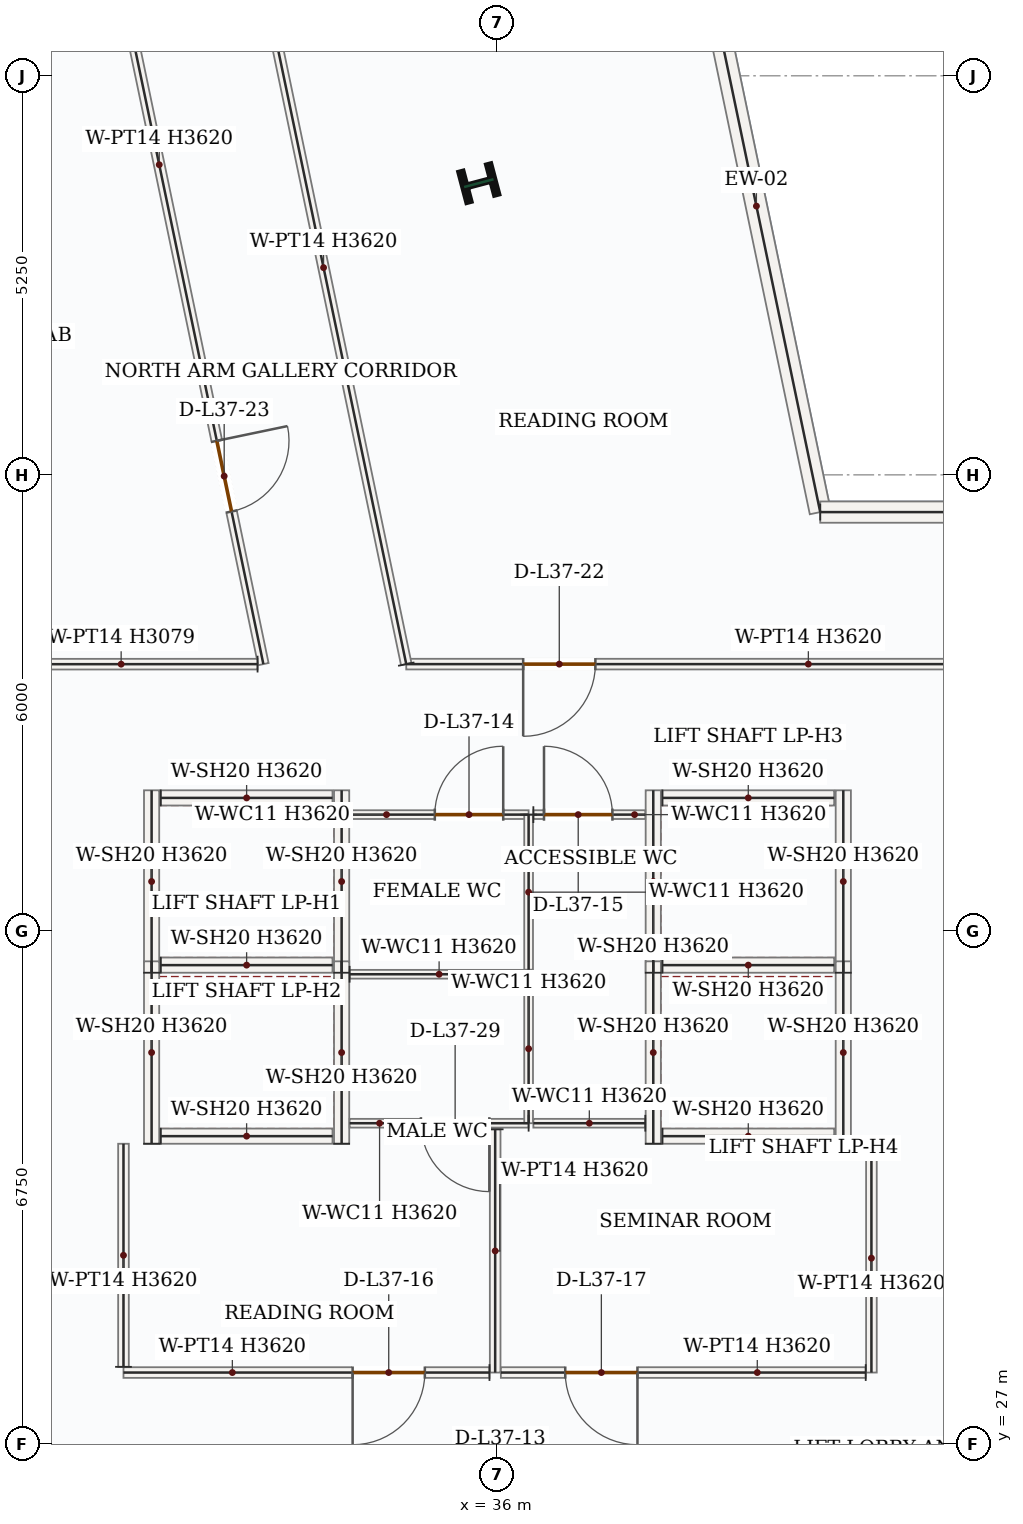
"""IFC4 building model, lengths in metres.
Left out: names, types, materials, properties, quantities, classifications, styles, units other than length and angle.
Written with IfcOpenShell. Run it as: python <this file> out.ifc"""

import sys

from ifc_helpers import new_model, si_unit, direction, frame, frame_2d, origin, origin_2d, place, context, subcontext, project, spatial, rectangle, i_section, extrude, source, transform, mapped, element, fill, save


model = new_model("IFC4")
c1 = context("Model", 3, precision=1e-05, world=origin(), true_north=direction((0.0, 1.0)))
c2 = subcontext(c1, "Body", "Model", "MODEL_VIEW")
j1 = project(units=[si_unit("LENGTHUNIT", "METRE"), si_unit("PLANEANGLEUNIT", "RADIAN")], contexts=[c1])
p1 = place(None, origin())
s1 = spatial("IfcSite", under=j1, at=p1, CompositionType="ELEMENT")
p2 = place(p1, origin())
s2 = spatial("IfcBuilding", under=s1, at=p2, CompositionType="ELEMENT")
p3 = place(p2, frame((0.0, 0.0, 162.9)))
s3 = spatial("IfcBuildingStorey", under=s2, at=p3, CompositionType="ELEMENT", Elevation=162.9)
m1 = source(origin(), c2, "Body", "SweptSolid", [
    extrude(i_section(OverallWidth=0.412, OverallDepth=0.435, WebThickness=0.036, FlangeThickness=0.057, FilletRadius=0.018, at=origin_2d()), origin(), (0.0, 0.0, 1.0), 3.9),
])
p4 = place(p3, frame((35.755, 43.588, 0.0), z_axis=(0.0, 0.0, 1.0), x_axis=(-0.255445757936, 0.966823388604, 0.0)))
e1 = element("IfcColumn", 1, at=p4, inside=s3, PredefinedType="COLUMN", context=c2, shape_type="MappedRepresentation", body=[
    mapped(m1, transform((0.0, 0.0, 0.0), x_axis=(1.0, 0.0, 0.0), y_axis=(0.0, 1.0, 0.0), z_axis=(0.0, 0.0, 1.0), scale=1.0)),
])
m2 = source(origin(), c2, "Body", "SweptSolid", [
    extrude(rectangle(XDim=8.225, YDim=0.28, at=frame_2d((4.113, 0.0))), origin(), (0.0, 0.0, 1.0), 3.62),
])
p5 = place(p3, frame((38.567, 47.312, 0.0), z_axis=(0.0, 0.0, 1.0), x_axis=(0.204152195211, -0.978939161128, 0.0)))
e2 = element("IfcWall", 2, at=p5, inside=s3, PredefinedType="SOLIDWALL", context=c2, shape_type="MappedRepresentation", body=[
    mapped(m2, transform((0.0, 0.0, 0.0), x_axis=(1.0, 0.0, 0.0), y_axis=(0.0, 1.0, 0.0), z_axis=(0.0, 0.0, 1.0), scale=1.0)),
])
m3 = source(origin(), c2, "Body", "SweptSolid", [
    extrude(rectangle(XDim=9.095, YDim=0.28, at=frame_2d((4.548, 0.0))), origin(), (0.0, 0.0, 1.0), 3.62),
])
p6 = place(p3, frame((40.247, 39.26, 0.0), z_axis=(0.0, 0.0, 1.0), x_axis=(1.0, 0.0, 0.0)))
e3 = element("IfcWall", 3, at=p6, inside=s3, PredefinedType="SOLIDWALL", context=c2, shape_type="MappedRepresentation", body=[
    mapped(m3, transform((0.0, 0.0, 0.0), x_axis=(1.0, 0.0, 0.0), y_axis=(0.0, 1.0, 0.0), z_axis=(0.0, 0.0, 1.0), scale=1.0)),
])
m4 = source(origin(), c2, "Body", "SweptSolid", [
    extrude(rectangle(XDim=2.4, YDim=0.2, at=frame_2d((1.2, 0.0))), origin(), (0.0, 0.0, 1.0), 3.62),
])
for number, where, z_axis, x_axis in (
    (4, (31.45, 33.2, 0.0), (0.0, 0.0, 1.0), (0.0, 1.0, 0.0)),
    (5, (33.95, 33.2, 0.0), (0.0, 0.0, 1.0), (0.0, 1.0, 0.0)),
):
    element("IfcWall", number, at=place(p3, frame(where, z_axis=z_axis, x_axis=x_axis)), inside=s3, PredefinedType="SOLIDWALL", context=c2, shape_type="MappedRepresentation", body=[
        mapped(m4, transform((0.0, 0.0, 0.0), x_axis=(1.0, 0.0, 0.0), y_axis=(0.0, 1.0, 0.0), z_axis=(0.0, 0.0, 1.0), scale=1.0)),
    ])
m5 = source(origin(), c2, "Body", "SweptSolid", [
    extrude(rectangle(XDim=2.26, YDim=0.2, at=frame_2d((1.13, 0.0))), origin(), (0.0, 0.0, 1.0), 3.62),
])
for number, where, z_axis, x_axis in (
    (6, (31.57, 33.3, 0.0), (0.0, 0.0, 1.0), (1.0, 0.0, 0.0)),
    (7, (31.57, 35.5, 0.0), (0.0, 0.0, 1.0), (1.0, 0.0, 0.0)),
):
    element("IfcWall", number, at=place(p3, frame(where, z_axis=z_axis, x_axis=x_axis)), inside=s3, PredefinedType="SOLIDWALL", context=c2, shape_type="MappedRepresentation", body=[
        mapped(m5, transform((0.0, 0.0, 0.0), x_axis=(1.0, 0.0, 0.0), y_axis=(0.0, 1.0, 0.0), z_axis=(0.0, 0.0, 1.0), scale=1.0)),
    ])
for number, where, z_axis, x_axis in (
    (8, (31.45, 30.95, 0.0), (0.0, 0.0, 1.0), (0.0, 1.0, 0.0)),
    (9, (33.95, 30.95, 0.0), (0.0, 0.0, 1.0), (0.0, 1.0, 0.0)),
):
    element("IfcWall", number, at=place(p3, frame(where, z_axis=z_axis, x_axis=x_axis)), inside=s3, PredefinedType="SOLIDWALL", context=c2, shape_type="MappedRepresentation", body=[
        mapped(m4, transform((0.0, 0.0, 0.0), x_axis=(1.0, 0.0, 0.0), y_axis=(0.0, 1.0, 0.0), z_axis=(0.0, 0.0, 1.0), scale=1.0)),
    ])
p7 = place(p3, frame((31.57, 31.05, 0.0), z_axis=(0.0, 0.0, 1.0), x_axis=(1.0, 0.0, 0.0)))
e10 = element("IfcWall", 10, at=p7, inside=s3, PredefinedType="SOLIDWALL", context=c2, shape_type="MappedRepresentation", body=[
    mapped(m5, transform((0.0, 0.0, 0.0), x_axis=(1.0, 0.0, 0.0), y_axis=(0.0, 1.0, 0.0), z_axis=(0.0, 0.0, 1.0), scale=1.0)),
])
for number, where, z_axis, x_axis in (
    (11, (38.05, 33.2, 0.0), (0.0, 0.0, 1.0), (0.0, 1.0, 0.0)),
    (12, (40.55, 33.2, 0.0), (0.0, 0.0, 1.0), (0.0, 1.0, 0.0)),
):
    element("IfcWall", number, at=place(p3, frame(where, z_axis=z_axis, x_axis=x_axis)), inside=s3, PredefinedType="SOLIDWALL", context=c2, shape_type="MappedRepresentation", body=[
        mapped(m4, transform((0.0, 0.0, 0.0), x_axis=(1.0, 0.0, 0.0), y_axis=(0.0, 1.0, 0.0), z_axis=(0.0, 0.0, 1.0), scale=1.0)),
    ])
for number, where, z_axis, x_axis in (
    (13, (38.17, 33.3, 0.0), (0.0, 0.0, 1.0), (1.0, 0.0, 0.0)),
    (14, (38.17, 35.5, 0.0), (0.0, 0.0, 1.0), (1.0, 0.0, 0.0)),
):
    element("IfcWall", number, at=place(p3, frame(where, z_axis=z_axis, x_axis=x_axis)), inside=s3, PredefinedType="SOLIDWALL", context=c2, shape_type="MappedRepresentation", body=[
        mapped(m5, transform((0.0, 0.0, 0.0), x_axis=(1.0, 0.0, 0.0), y_axis=(0.0, 1.0, 0.0), z_axis=(0.0, 0.0, 1.0), scale=1.0)),
    ])
for number, where, z_axis, x_axis in (
    (15, (38.05, 30.95, 0.0), (0.0, 0.0, 1.0), (0.0, 1.0, 0.0)),
    (16, (40.55, 30.95, 0.0), (0.0, 0.0, 1.0), (0.0, 1.0, 0.0)),
):
    element("IfcWall", number, at=place(p3, frame(where, z_axis=z_axis, x_axis=x_axis)), inside=s3, PredefinedType="SOLIDWALL", context=c2, shape_type="MappedRepresentation", body=[
        mapped(m4, transform((0.0, 0.0, 0.0), x_axis=(1.0, 0.0, 0.0), y_axis=(0.0, 1.0, 0.0), z_axis=(0.0, 0.0, 1.0), scale=1.0)),
    ])
p8 = place(p3, frame((38.17, 31.05, 0.0), z_axis=(0.0, 0.0, 1.0), x_axis=(1.0, 0.0, 0.0)))
e17 = element("IfcWall", 17, at=p8, inside=s3, PredefinedType="SOLIDWALL", context=c2, shape_type="MappedRepresentation", body=[
    mapped(m5, transform((0.0, 0.0, 0.0), x_axis=(1.0, 0.0, 0.0), y_axis=(0.0, 1.0, 0.0), z_axis=(0.0, 0.0, 1.0), scale=1.0)),
])
p9 = place(p3, frame((36.41, 31.22, 0.0), z_axis=(0.0, 0.0, 1.0), x_axis=(-1.0, 0.0, 0.0)))
e18 = element("IfcWall", 18, at=p9, inside=s3, PredefinedType="PARTITIONING", context=c2, shape_type="SweptSolid", body=[
    extrude(rectangle(XDim=2.355, YDim=0.115, at=frame_2d((1.177, 0.0))), origin(), (0.0, 0.0, 1.0), 3.62),
])
p10 = place(p9, frame((0.517, 0.0, 0.0)))
e19 = element("IfcOpeningElement", 19, at=p10, cuts=e18, PredefinedType="OPENING", context=c2, shape_type="SweptSolid", body=[
    extrude(rectangle(XDim=0.9, YDim=2.1, at=frame_2d((0.45, 1.05))), frame((0.0, 0.067, 0.0), z_axis=(0.0, -1.0, 0.0), x_axis=(1.0, 0.0, 0.0)), (0.0, 0.0, 1.0), 0.135),
])
m6 = source(origin(), c2, "Body", "SweptSolid", [
    extrude(rectangle(XDim=2.355, YDim=0.115, at=frame_2d((1.177, 0.0))), origin(), (0.0, 0.0, 1.0), 3.62),
])
p11 = place(p3, frame((34.055, 33.18, 0.0), z_axis=(0.0, 0.0, 1.0), x_axis=(1.0, 0.0, 0.0)))
e20 = element("IfcWall", 20, at=p11, inside=s3, PredefinedType="PARTITIONING", context=c2, shape_type="MappedRepresentation", body=[
    mapped(m6, transform((0.0, 0.0, 0.0), x_axis=(1.0, 0.0, 0.0), y_axis=(0.0, 1.0, 0.0), z_axis=(0.0, 0.0, 1.0), scale=1.0)),
])
m7 = source(origin(), c2, "Body", "SweptSolid", [
    extrude(rectangle(XDim=1.96, YDim=0.115, at=frame_2d((0.98, 0.0))), origin(), (0.0, 0.0, 1.0), 3.62),
])
p12 = place(p3, frame((36.41, 33.18, 0.0), z_axis=(0.0, 0.0, 1.0), x_axis=(0.0, -1.0, 0.0)))
e21 = element("IfcWall", 21, at=p12, inside=s3, PredefinedType="PARTITIONING", context=c2, shape_type="MappedRepresentation", body=[
    mapped(m7, transform((0.0, 0.0, 0.0), x_axis=(1.0, 0.0, 0.0), y_axis=(0.0, 1.0, 0.0), z_axis=(0.0, 0.0, 1.0), scale=1.0)),
])
p13 = place(p3, frame((34.055, 35.28, 0.0), z_axis=(0.0, 0.0, 1.0), x_axis=(1.0, 0.0, 0.0)))
e22 = element("IfcWall", 22, at=p13, inside=s3, PredefinedType="PARTITIONING", context=c2, shape_type="SweptSolid", body=[
    extrude(rectangle(XDim=2.355, YDim=0.115, at=frame_2d((1.177, 0.0))), origin(), (0.0, 0.0, 1.0), 3.62),
])
p14 = place(p13, frame((1.121, 0.0, 0.0)))
e23 = element("IfcOpeningElement", 23, at=p14, cuts=e22, PredefinedType="OPENING", context=c2, shape_type="SweptSolid", body=[
    extrude(rectangle(XDim=0.9, YDim=2.1, at=frame_2d((0.45, 1.05))), frame((0.0, 0.067, 0.0), z_axis=(0.0, -1.0, 0.0), x_axis=(1.0, 0.0, 0.0)), (0.0, 0.0, 1.0), 0.135),
])
m8 = source(origin(), c2, "Body", "SweptSolid", [
    extrude(rectangle(XDim=2.04, YDim=0.115, at=frame_2d((1.02, 0.0))), origin(), (0.0, 0.0, 1.0), 3.62),
])
p15 = place(p3, frame((36.41, 35.28, 0.0), z_axis=(0.0, 0.0, 1.0), x_axis=(0.0, -1.0, 0.0)))
e24 = element("IfcWall", 24, at=p15, inside=s3, PredefinedType="PARTITIONING", context=c2, shape_type="MappedRepresentation", body=[
    mapped(m8, transform((0.0, 0.0, 0.0), x_axis=(1.0, 0.0, 0.0), y_axis=(0.0, 1.0, 0.0), z_axis=(0.0, 0.0, 1.0), scale=1.0)),
])
m9 = source(origin(), c2, "Body", "SweptSolid", [
    extrude(rectangle(XDim=1.473, YDim=0.115, at=frame_2d((0.736, 0.0))), origin(), (0.0, 0.0, 1.0), 3.62),
])
p16 = place(p3, frame((37.945, 31.22, 0.0), z_axis=(0.0, 0.0, 1.0), x_axis=(-1.0, 0.0, 0.0)))
e25 = element("IfcWall", 25, at=p16, inside=s3, PredefinedType="PARTITIONING", context=c2, shape_type="MappedRepresentation", body=[
    mapped(m9, transform((0.0, 0.0, 0.0), x_axis=(1.0, 0.0, 0.0), y_axis=(0.0, 1.0, 0.0), z_axis=(0.0, 0.0, 1.0), scale=1.0)),
])
p17 = place(p3, frame((36.472, 35.28, 0.0), z_axis=(0.0, 0.0, 1.0), x_axis=(1.0, 0.0, 0.0)))
e26 = element("IfcWall", 26, at=p17, inside=s3, PredefinedType="PARTITIONING", context=c2, shape_type="SweptSolid", body=[
    extrude(rectangle(XDim=1.473, YDim=0.115, at=frame_2d((0.736, 0.0))), origin(), (0.0, 0.0, 1.0), 3.62),
])
p18 = place(p17, frame((0.14, 0.0, 0.0)))
e27 = element("IfcOpeningElement", 27, at=p18, cuts=e26, PredefinedType="OPENING", context=c2, shape_type="SweptSolid", body=[
    extrude(rectangle(XDim=0.9, YDim=2.1, at=frame_2d((0.45, 1.05))), frame((0.0, 0.067, 0.0), z_axis=(0.0, -1.0, 0.0), x_axis=(1.0, 0.0, 0.0)), (0.0, 0.0, 1.0), 0.135),
])
m10 = source(origin(), c2, "Body", "SweptSolid", [
    extrude(rectangle(XDim=3.2, YDim=0.14, at=frame_2d((1.6, 0.0))), origin(), (0.0, 0.0, 1.0), 3.62),
])
p19 = place(p3, frame((35.97, 31.14, 0.0), z_axis=(0.0, 0.0, 1.0), x_axis=(0.0, -1.0, 0.0)))
e28 = element("IfcWall", 28, at=p19, inside=s3, PredefinedType="PARTITIONING", context=c2, shape_type="MappedRepresentation", body=[
    mapped(m10, transform((0.0, 0.0, 0.0), x_axis=(1.0, 0.0, 0.0), y_axis=(0.0, 1.0, 0.0), z_axis=(0.0, 0.0, 1.0), scale=1.0)),
])
p20 = place(p3, frame((35.895, 27.94, 0.0), z_axis=(0.0, 0.0, 1.0), x_axis=(-1.0, 0.0, 0.0)))
e29 = element("IfcWall", 29, at=p20, inside=s3, PredefinedType="PARTITIONING", context=c2, shape_type="SweptSolid", body=[
    extrude(rectangle(XDim=4.815, YDim=0.14, at=frame_2d((2.407, 0.0))), origin(), (0.0, 0.0, 1.0), 3.62),
])
p21 = place(p20, frame((0.85, 0.0, 0.0)))
e30 = element("IfcOpeningElement", 30, at=p21, cuts=e29, PredefinedType="OPENING", context=c2, shape_type="SweptSolid", body=[
    extrude(rectangle(XDim=0.95, YDim=2.15, at=frame_2d((0.475, 1.075))), frame((0.0, 0.08, 0.0), z_axis=(0.0, -1.0, 0.0), x_axis=(1.0, 0.0, 0.0)), (0.0, 0.0, 1.0), 0.16),
])
m11 = source(origin(), c2, "Body", "SweptSolid", [
    extrude(rectangle(XDim=2.935, YDim=0.14, at=frame_2d((1.468, 0.0))), origin(), (0.0, 0.0, 1.0), 3.62),
])
p22 = place(p3, frame((31.08, 28.015, 0.0), z_axis=(0.0, 0.0, 1.0), x_axis=(0.0, 1.0, 0.0)))
e31 = element("IfcWall", 31, at=p22, inside=s3, PredefinedType="PARTITIONING", context=c2, shape_type="MappedRepresentation", body=[
    mapped(m11, transform((0.0, 0.0, 0.0), x_axis=(1.0, 0.0, 0.0), y_axis=(0.0, 1.0, 0.0), z_axis=(0.0, 0.0, 1.0), scale=1.0)),
])
m12 = source(origin(), c2, "Body", "SweptSolid", [
    extrude(rectangle(XDim=3.01, YDim=0.14, at=frame_2d((1.505, 0.0))), origin(), (0.0, 0.0, 1.0), 3.62),
])
p23 = place(p3, frame((40.92, 30.95, 0.0), z_axis=(0.0, 0.0, 1.0), x_axis=(0.0, -1.0, 0.0)))
e32 = element("IfcWall", 32, at=p23, inside=s3, PredefinedType="PARTITIONING", context=c2, shape_type="MappedRepresentation", body=[
    mapped(m12, transform((0.0, 0.0, 0.0), x_axis=(1.0, 0.0, 0.0), y_axis=(0.0, 1.0, 0.0), z_axis=(0.0, 0.0, 1.0), scale=1.0)),
])
p24 = place(p3, frame((40.845, 27.94, 0.0), z_axis=(0.0, 0.0, 1.0), x_axis=(-1.0, 0.0, 0.0)))
e33 = element("IfcWall", 33, at=p24, inside=s3, PredefinedType="PARTITIONING", context=c2, shape_type="SweptSolid", body=[
    extrude(rectangle(XDim=4.8, YDim=0.14, at=frame_2d((2.4, 0.0))), origin(), (0.0, 0.0, 1.0), 3.62),
])
p25 = place(p24, frame((3.003, 0.0, 0.0)))
e34 = element("IfcOpeningElement", 34, at=p25, cuts=e33, PredefinedType="OPENING", context=c2, shape_type="SweptSolid", body=[
    extrude(rectangle(XDim=0.95, YDim=2.15, at=frame_2d((0.475, 1.075))), frame((0.0, 0.08, 0.0), z_axis=(0.0, -1.0, 0.0), x_axis=(1.0, 0.0, 0.0)), (0.0, 0.0, 1.0), 0.16),
])
p26 = place(p3, frame((42.742, 37.26, 0.0), z_axis=(0.0, 0.0, 1.0), x_axis=(-1.0, 0.0, 0.0)))
e35 = element("IfcWall", 35, at=p26, inside=s3, PredefinedType="PARTITIONING", context=c2, shape_type="SweptSolid", body=[
    extrude(rectangle(XDim=7.942, YDim=0.14, at=frame_2d((3.971, 0.0))), origin(), (0.0, 0.0, 1.0), 3.62),
])
p27 = place(p26, frame((5.454, 0.0, 0.0)))
e36 = element("IfcOpeningElement", 36, at=p27, cuts=e35, PredefinedType="OPENING", context=c2, shape_type="SweptSolid", body=[
    extrude(rectangle(XDim=0.95, YDim=2.15, at=frame_2d((0.475, 1.075))), frame((0.0, 0.08, 0.0), z_axis=(0.0, -1.0, 0.0), x_axis=(1.0, 0.0, 0.0)), (0.0, 0.0, 1.0), 0.16),
])
m13 = source(origin(), c2, "Body", "SweptSolid", [
    extrude(rectangle(XDim=10.656, YDim=0.14, at=frame_2d((5.328, 0.0))), origin(), (0.0, 0.0, 1.0), 3.62),
])
p28 = place(p3, frame((34.8, 37.26, 0.0), z_axis=(0.0, 0.0, 1.0), x_axis=(-0.204159189901, 0.978937702399, 0.0)))
e37 = element("IfcWall", 37, at=p28, inside=s3, PredefinedType="PARTITIONING", context=c2, shape_type="MappedRepresentation", body=[
    mapped(m13, transform((0.0, 0.0, 0.0), x_axis=(1.0, 0.0, 0.0), y_axis=(0.0, 1.0, 0.0), z_axis=(0.0, 0.0, 1.0), scale=1.0)),
])
p29 = place(p3, frame((30.823, 47.316, 0.0), z_axis=(0.0, 0.0, 1.0), x_axis=(0.204130779611, -0.978943626985, 0.0)))
e38 = element("IfcWall", 38, at=p29, inside=s3, PredefinedType="PARTITIONING", context=c2, shape_type="SweptSolid", body=[
    extrude(rectangle(XDim=10.272, YDim=0.14, at=frame_2d((5.136, 0.0))), origin(), (0.0, 0.0, 1.0), 3.62),
])
p30 = place(p29, frame((7.271, 0.0, 0.0)))
e39 = element("IfcOpeningElement", 39, at=p30, cuts=e38, PredefinedType="OPENING", context=c2, shape_type="SweptSolid", body=[
    extrude(rectangle(XDim=0.95, YDim=2.15, at=frame_2d((0.475, 1.075))), frame((0.0, 0.08, 0.0), z_axis=(0.0, -1.0, 0.0), x_axis=(1.0, 0.0, 0.0)), (0.0, 0.0, 1.0), 0.16),
])
m14 = source(origin(), c2, "Body", "SweptSolid", [
    extrude(rectangle(XDim=3.589, YDim=0.14, at=frame_2d((1.794, 0.0))), origin(), (0.0, 0.0, 1.0), 3.079),
])
p31 = place(p3, frame((32.844, 37.26, 0.0), z_axis=(0.0, 0.0, 1.0), x_axis=(-0.999999942162, -0.000340112898, 0.0)))
e40 = element("IfcWall", 40, at=p31, inside=s3, PredefinedType="PARTITIONING", context=c2, shape_type="MappedRepresentation", body=[
    mapped(m14, transform((0.0, 0.0, 0.0), x_axis=(1.0, 0.0, 0.0), y_axis=(0.0, 1.0, 0.0), z_axis=(0.0, 0.0, 1.0), scale=1.0)),
])
m15 = source(origin(), c2, "Body", "SweptSolid", [
    extrude(rectangle(XDim=0.9, YDim=2.1, at=frame_2d((0.45, 1.05))), frame((0.0, 0.025, 0.0), z_axis=(0.0, -1.0, 0.0), x_axis=(1.0, 0.0, 0.0)), (0.0, 0.0, 1.0), 0.05),
])
p32 = place(p14, origin())
e41 = element("IfcDoor", 41, at=p32, inside=s3, OperationType="SINGLE_SWING_RIGHT", PredefinedType="DOOR", context=c2, shape_type="MappedRepresentation", body=[
    mapped(m15, transform((0.0, 0.0, 0.0), x_axis=(1.0, 0.0, 0.0), y_axis=(0.0, 1.0, 0.0), z_axis=(0.0, 0.0, 1.0), scale=1.0)),
])
fill(e23, e41)
p33 = place(p18, origin())
e42 = element("IfcDoor", 42, at=p33, inside=s3, OperationType="SINGLE_SWING_LEFT", PredefinedType="DOOR", context=c2, shape_type="MappedRepresentation", body=[
    mapped(m15, transform((0.0, 0.0, 0.0), x_axis=(1.0, 0.0, 0.0), y_axis=(0.0, 1.0, 0.0), z_axis=(0.0, 0.0, 1.0), scale=1.0)),
])
fill(e27, e42)
m16 = source(origin(), c2, "Body", "SweptSolid", [
    extrude(rectangle(XDim=0.95, YDim=2.15, at=frame_2d((0.475, 1.075))), frame((0.0, 0.025, 0.0), z_axis=(0.0, -1.0, 0.0), x_axis=(1.0, 0.0, 0.0)), (0.0, 0.0, 1.0), 0.05),
])
p34 = place(p21, origin())
e43 = element("IfcDoor", 43, at=p34, inside=s3, OperationType="SINGLE_SWING_RIGHT", PredefinedType="DOOR", context=c2, shape_type="MappedRepresentation", body=[
    mapped(m16, transform((0.0, 0.0, 0.0), x_axis=(1.0, 0.0, 0.0), y_axis=(0.0, 1.0, 0.0), z_axis=(0.0, 0.0, 1.0), scale=1.0)),
])
fill(e30, e43)
p35 = place(p25, origin())
e44 = element("IfcDoor", 44, at=p35, inside=s3, OperationType="SINGLE_SWING_LEFT", PredefinedType="DOOR", context=c2, shape_type="MappedRepresentation", body=[
    mapped(m16, transform((0.0, 0.0, 0.0), x_axis=(1.0, 0.0, 0.0), y_axis=(0.0, 1.0, 0.0), z_axis=(0.0, 0.0, 1.0), scale=1.0)),
])
fill(e34, e44)
p36 = place(p27, origin())
e45 = element("IfcDoor", 45, at=p36, inside=s3, OperationType="SINGLE_SWING_RIGHT", PredefinedType="DOOR", context=c2, shape_type="MappedRepresentation", body=[
    mapped(m16, transform((0.0, 0.0, 0.0), x_axis=(1.0, 0.0, 0.0), y_axis=(0.0, 1.0, 0.0), z_axis=(0.0, 0.0, 1.0), scale=1.0)),
])
fill(e36, e45)
p37 = place(p30, origin())
e46 = element("IfcDoor", 46, at=p37, inside=s3, OperationType="SINGLE_SWING_LEFT", PredefinedType="DOOR", context=c2, shape_type="MappedRepresentation", body=[
    mapped(m16, transform((0.0, 0.0, 0.0), x_axis=(1.0, 0.0, 0.0), y_axis=(0.0, 1.0, 0.0), z_axis=(0.0, 0.0, 1.0), scale=1.0)),
])
fill(e39, e46)
p38 = place(p10, origin())
e47 = element("IfcDoor", 47, at=p38, inside=s3, OperationType="SINGLE_SWING_LEFT", PredefinedType="DOOR", context=c2, shape_type="MappedRepresentation", body=[
    mapped(m15, transform((0.0, 0.0, 0.0), x_axis=(1.0, 0.0, 0.0), y_axis=(0.0, 1.0, 0.0), z_axis=(0.0, 0.0, 1.0), scale=1.0)),
])
fill(e19, e47)
save(model, sys.argv[1])
